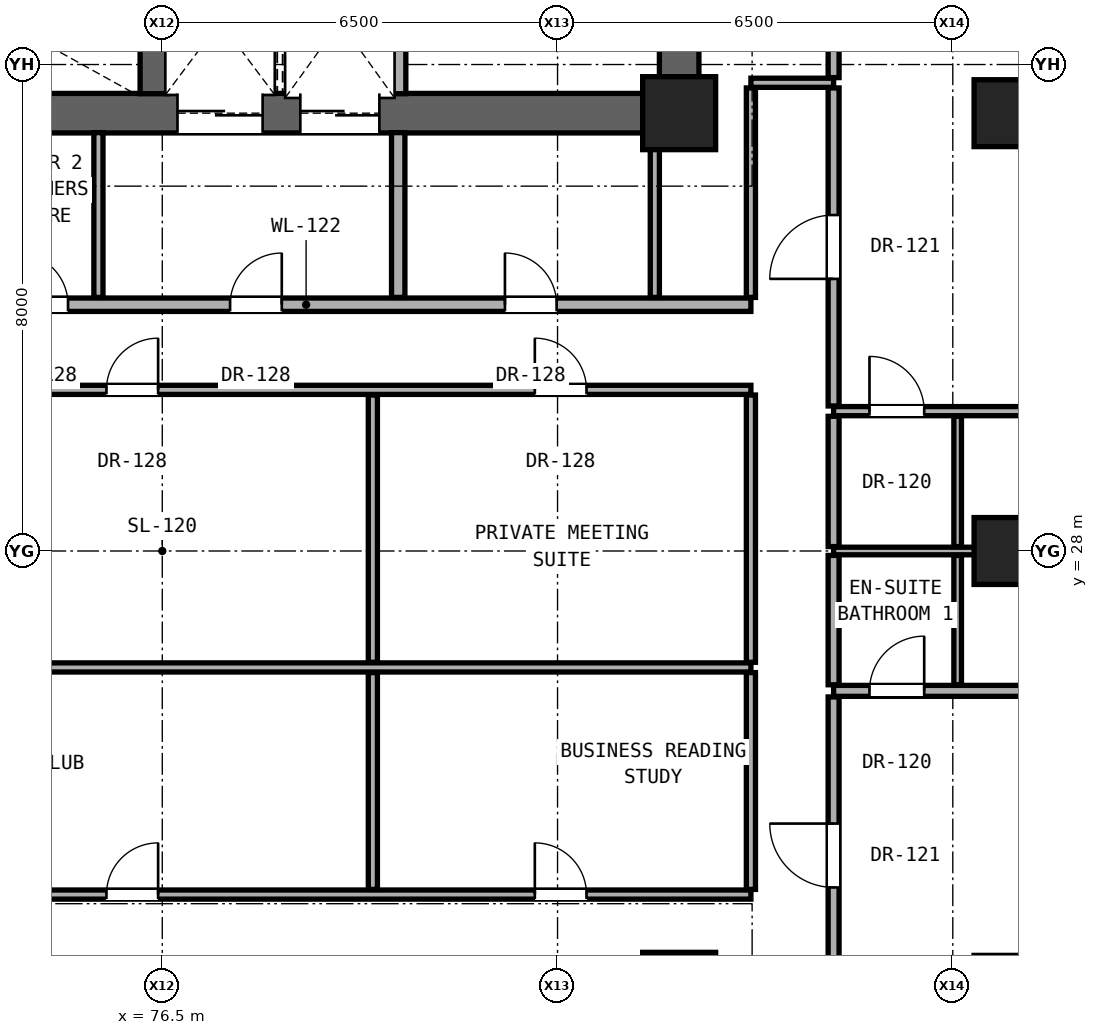
"""IFC4 building model, lengths in metres.
Left out: names, types, materials, properties, quantities, classifications, styles, units other than length and angle.
Written with IfcOpenShell. Run it as: python <this file> out.ifc"""

import sys

from ifc_helpers import new_model, si_unit, direction, frame, frame_2d, origin, origin_2d, place, context, subcontext, project, spatial, rectangle, hollow_rectangle, extrude, element, fill, save


model = new_model("IFC4")
c1 = context("Model", 3, precision=1e-05, world=origin(), true_north=direction((0.0, 1.0)))
c2 = subcontext(c1, "Body", "Model", "MODEL_VIEW")
j1 = project(units=[si_unit("LENGTHUNIT", "METRE"), si_unit("PLANEANGLEUNIT", "RADIAN")], contexts=[c1])
p1 = place(None, origin())
s1 = spatial("IfcSite", under=j1, at=p1, CompositionType="ELEMENT")
p2 = place(p1, origin())
s2 = spatial("IfcBuilding", under=s1, at=p2, CompositionType="ELEMENT")
p3 = place(p2, frame((0.0, 0.0, 104.9)))
s3 = spatial("IfcBuildingStorey", under=s2, at=p3, CompositionType="ELEMENT", Elevation=104.9)
for number, where, z_axis, x_axis in (
    (1, (85.0, 20.8, 0.0), (0.0, 0.0, 1.0), (1.0, 0.0, 0.0)),
    (2, (85.0, 35.2, 0.0), (0.0, 0.0, 1.0), (1.0, 0.0, 0.0)),
):
    element("IfcColumn", number, at=place(p3, frame(where, z_axis=z_axis, x_axis=x_axis)), inside=s3, PredefinedType="COLUMN", context=c2, shape_type="SweptSolid", body=[
        extrude(rectangle(XDim=1.2, YDim=1.2, at=origin_2d()), origin(), (0.0, 0.0, 1.0), 3.3),
    ])
for number, where, z_axis, x_axis in (
    (3, (90.4, 28.0, 0.0), (0.0, 0.0, 1.0), (1.0, 0.0, 0.0)),
    (4, (90.4, 35.2, 0.0), (0.0, 0.0, 1.0), (1.0, 0.0, 0.0)),
):
    element("IfcColumn", number, at=place(p3, frame(where, z_axis=z_axis, x_axis=x_axis)), inside=s3, PredefinedType="COLUMN", context=c2, shape_type="SweptSolid", body=[
        extrude(hollow_rectangle(XDim=1.1, YDim=1.1, WallThickness=0.06, at=origin_2d()), origin(), (0.0, 0.0, 1.0), 3.3),
    ])
p4 = place(p3, frame((85.0, 35.2, 0.0), z_axis=(0.0, 0.0, 1.0), x_axis=(0.0, 1.0, 0.0)))
e5 = element("IfcWall", 5, at=p4, inside=s3, PredefinedType="SHEAR", context=c2, shape_type="SweptSolid", body=[
    extrude(rectangle(XDim=5.6, YDim=0.65, at=frame_2d((2.8, 0.0))), origin(), (0.0, 0.0, 1.0), 3.08),
])
p5 = place(p3, frame((68.0, 35.2, 0.0), z_axis=(0.0, 0.0, 1.0), x_axis=(1.0, 0.0, 0.0)))
e6 = element("IfcWall", 6, at=p5, inside=s3, PredefinedType="SHEAR", context=c2, shape_type="SweptSolid", body=[
    extrude(rectangle(XDim=17.0, YDim=0.65, at=frame_2d((8.5, 0.0))), origin(), (0.0, 0.0, 1.0), 3.08),
])
p6 = place(p5, frame((1.06, 0.0, 0.0)))
e7 = element("IfcOpeningElement", 7, at=p6, cuts=e6, PredefinedType="OPENING", context=c2, shape_type="SweptSolid", body=[
    extrude(rectangle(XDim=1.15, YDim=2.2, at=frame_2d((0.575, 1.1))), frame((0.0, 0.335, 0.0), z_axis=(0.0, -1.0, 0.0), x_axis=(1.0, 0.0, 0.0)), (0.0, 0.0, 1.0), 0.67),
])
p7 = place(p5, frame((8.75, 0.0, 0.0)))
e8 = element("IfcOpeningElement", 8, at=p7, cuts=e6, PredefinedType="OPENING", context=c2, shape_type="SweptSolid", body=[
    extrude(rectangle(XDim=1.4, YDim=2.35, at=frame_2d((0.7, 1.175))), frame((0.0, 0.335, 0.0), z_axis=(0.0, -1.0, 0.0), x_axis=(1.0, 0.0, 0.0)), (0.0, 0.0, 1.0), 0.67),
])
p8 = place(p5, frame((10.77, 0.0, 0.0)))
e9 = element("IfcOpeningElement", 9, at=p8, cuts=e6, PredefinedType="OPENING", context=c2, shape_type="SweptSolid", body=[
    extrude(rectangle(XDim=1.3, YDim=2.3, at=frame_2d((0.65, 1.15))), frame((0.0, 0.335, 0.0), z_axis=(0.0, -1.0, 0.0), x_axis=(1.0, 0.0, 0.0)), (0.0, 0.0, 1.0), 0.67),
])
p9 = place(p3, frame((66.68, 22.35, 0.0), z_axis=(0.0, 0.0, 1.0), x_axis=(1.0, 0.0, 0.0)))
e10 = element("IfcWall", 10, at=p9, inside=s3, PredefinedType="PARTITIONING", context=c2, shape_type="SweptSolid", body=[
    extrude(rectangle(XDim=19.5, YDim=0.15, at=frame_2d((9.75, 0.0))), origin(), (0.0, 0.0, 1.0), 2.145),
])
p10 = place(p9, frame((8.902, 0.0, 0.0)))
e11 = element("IfcOpeningElement", 11, at=p10, cuts=e10, PredefinedType="OPENING", context=c2, shape_type="SweptSolid", body=[
    extrude(rectangle(XDim=0.85, YDim=2.01, at=frame_2d((0.425, 1.005))), frame((0.0, 0.085, 0.0), z_axis=(0.0, -1.0, 0.0), x_axis=(1.0, 0.0, 0.0)), (0.0, 0.0, 1.0), 0.17),
])
p11 = place(p9, frame((15.947, 0.0, 0.0)))
e12 = element("IfcOpeningElement", 12, at=p11, cuts=e10, PredefinedType="OPENING", context=c2, shape_type="SweptSolid", body=[
    extrude(rectangle(XDim=0.85, YDim=2.01, at=frame_2d((0.425, 1.005))), frame((0.0, 0.085, 0.0), z_axis=(0.0, -1.0, 0.0), x_axis=(1.0, 0.0, 0.0)), (0.0, 0.0, 1.0), 0.17),
])
p12 = place(p3, frame((87.54, 25.7, 0.0), z_axis=(0.0, 0.0, 1.0), x_axis=(1.0, 0.0, 0.0)))
e13 = element("IfcWall", 13, at=p12, inside=s3, PredefinedType="PARTITIONING", context=c2, shape_type="SweptSolid", body=[
    extrude(rectangle(XDim=7.292, YDim=0.18, at=frame_2d((3.646, 0.0))), origin(), (0.0, 0.0, 1.0), 2.216),
])
p13 = place(p12, frame((4.171, 0.0, 0.0)))
e14 = element("IfcOpeningElement", 14, at=p13, cuts=e13, PredefinedType="OPENING", context=c2, shape_type="SweptSolid", body=[
    extrude(rectangle(XDim=0.95, YDim=2.15, at=frame_2d((0.475, 1.075))), frame((0.0, 0.1, 0.0), z_axis=(0.0, -1.0, 0.0), x_axis=(1.0, 0.0, 0.0)), (0.0, 0.0, 1.0), 0.2),
])
p14 = place(p12, frame((0.59, 0.0, 0.0)))
e15 = element("IfcOpeningElement", 15, at=p14, cuts=e13, PredefinedType="OPENING", context=c2, shape_type="SweptSolid", body=[
    extrude(rectangle(XDim=0.9, YDim=2.1, at=frame_2d((0.45, 1.05))), frame((0.0, 0.1, 0.0), z_axis=(0.0, -1.0, 0.0), x_axis=(1.0, 0.0, 0.0)), (0.0, 0.0, 1.0), 0.2),
])
p15 = place(p3, frame((72.05, 26.085, 0.0), z_axis=(0.0, 0.0, 1.0), x_axis=(1.0, 0.0, 0.0)))
e16 = element("IfcWall", 16, at=p15, inside=s3, PredefinedType="PARTITIONING", context=c2, shape_type="SweptSolid", body=[
    extrude(rectangle(XDim=14.13, YDim=0.15, at=frame_2d((7.065, 0.0))), origin(), (0.0, 0.0, 1.0), 2.145),
])
p16 = place(p3, frame((87.54, 28.0, 0.0), z_axis=(0.0, 0.0, 1.0), x_axis=(1.0, 0.0, 0.0)))
e17 = element("IfcWall", 17, at=p16, inside=s3, PredefinedType="PARTITIONING", context=c2, shape_type="SweptSolid", body=[
    extrude(rectangle(XDim=7.292, YDim=0.125, at=frame_2d((3.646, 0.0))), origin(), (0.0, 0.0, 1.0), 2.216),
])
p17 = place(p3, frame((87.54, 30.3, 0.0), z_axis=(0.0, 0.0, 1.0), x_axis=(1.0, 0.0, 0.0)))
e18 = element("IfcWall", 18, at=p17, inside=s3, PredefinedType="PARTITIONING", context=c2, shape_type="SweptSolid", body=[
    extrude(rectangle(XDim=7.292, YDim=0.15, at=frame_2d((3.646, 0.0))), origin(), (0.0, 0.0, 1.0), 2.216),
])
p18 = place(p17, frame((4.171, 0.0, 0.0)))
e19 = element("IfcOpeningElement", 19, at=p18, cuts=e18, PredefinedType="OPENING", context=c2, shape_type="SweptSolid", body=[
    extrude(rectangle(XDim=0.95, YDim=2.15, at=frame_2d((0.475, 1.075))), frame((0.0, 0.085, 0.0), z_axis=(0.0, -1.0, 0.0), x_axis=(1.0, 0.0, 0.0)), (0.0, 0.0, 1.0), 0.17),
])
p19 = place(p17, frame((0.59, 0.0, 0.0)))
e20 = element("IfcOpeningElement", 20, at=p19, cuts=e18, PredefinedType="OPENING", context=c2, shape_type="SweptSolid", body=[
    extrude(rectangle(XDim=0.9, YDim=2.1, at=frame_2d((0.45, 1.05))), frame((0.0, 0.085, 0.0), z_axis=(0.0, -1.0, 0.0), x_axis=(1.0, 0.0, 0.0)), (0.0, 0.0, 1.0), 0.17),
])
p20 = place(p3, frame((66.68, 30.65, 0.0), z_axis=(0.0, 0.0, 1.0), x_axis=(1.0, 0.0, 0.0)))
e21 = element("IfcWall", 21, at=p20, inside=s3, PredefinedType="PARTITIONING", context=c2, shape_type="SweptSolid", body=[
    extrude(rectangle(XDim=19.5, YDim=0.15, at=frame_2d((9.75, 0.0))), origin(), (0.0, 0.0, 1.0), 2.145),
])
p21 = place(p20, frame((3.795, 0.0, 0.0)))
e22 = element("IfcOpeningElement", 22, at=p21, cuts=e21, PredefinedType="OPENING", context=c2, shape_type="SweptSolid", body=[
    extrude(rectangle(XDim=0.85, YDim=2.01, at=frame_2d((0.425, 1.005))), frame((0.0, 0.085, 0.0), z_axis=(0.0, -1.0, 0.0), x_axis=(1.0, 0.0, 0.0)), (0.0, 0.0, 1.0), 0.17),
])
p22 = place(p20, frame((8.902, 0.0, 0.0)))
e23 = element("IfcOpeningElement", 23, at=p22, cuts=e21, PredefinedType="OPENING", context=c2, shape_type="SweptSolid", body=[
    extrude(rectangle(XDim=0.85, YDim=2.01, at=frame_2d((0.425, 1.005))), frame((0.0, 0.085, 0.0), z_axis=(0.0, -1.0, 0.0), x_axis=(1.0, 0.0, 0.0)), (0.0, 0.0, 1.0), 0.17),
])
p23 = place(p20, frame((15.947, 0.0, 0.0)))
e24 = element("IfcOpeningElement", 24, at=p23, cuts=e21, PredefinedType="OPENING", context=c2, shape_type="SweptSolid", body=[
    extrude(rectangle(XDim=0.85, YDim=2.01, at=frame_2d((0.425, 1.005))), frame((0.0, 0.085, 0.0), z_axis=(0.0, -1.0, 0.0), x_axis=(1.0, 0.0, 0.0)), (0.0, 0.0, 1.0), 0.17),
])
p24 = place(p3, frame((71.55, 32.05, 0.0), z_axis=(0.0, 0.0, 1.0), x_axis=(1.0, 0.0, 0.0)))
e25 = element("IfcWall", 25, at=p24, inside=s3, PredefinedType="SOLIDWALL", context=c2, shape_type="SweptSolid", body=[
    extrude(rectangle(XDim=14.63, YDim=0.22, at=frame_2d((7.315, 0.0))), origin(), (0.0, 0.0, 1.0), 2.145),
])
p25 = place(p24, frame((6.065, 0.0, 0.0)))
e26 = element("IfcOpeningElement", 26, at=p25, cuts=e25, PredefinedType="OPENING", context=c2, shape_type="SweptSolid", body=[
    extrude(rectangle(XDim=0.85, YDim=2.01, at=frame_2d((0.425, 1.005))), frame((0.0, 0.12, 0.0), z_axis=(0.0, -1.0, 0.0), x_axis=(1.0, 0.0, 0.0)), (0.0, 0.0, 1.0), 0.24),
])
p26 = place(p24, frame((10.585, 0.0, 0.0)))
e27 = element("IfcOpeningElement", 27, at=p26, cuts=e25, PredefinedType="OPENING", context=c2, shape_type="SweptSolid", body=[
    extrude(rectangle(XDim=0.85, YDim=2.01, at=frame_2d((0.425, 1.005))), frame((0.0, 0.12, 0.0), z_axis=(0.0, -1.0, 0.0), x_axis=(1.0, 0.0, 0.0)), (0.0, 0.0, 1.0), 0.24),
])
p27 = place(p24, frame((0.7, 0.0, 0.0)))
e28 = element("IfcOpeningElement", 28, at=p27, cuts=e25, PredefinedType="OPENING", context=c2, shape_type="SweptSolid", body=[
    extrude(rectangle(XDim=0.85, YDim=2.01, at=frame_2d((0.425, 1.005))), frame((0.0, 0.12, 0.0), z_axis=(0.0, -1.0, 0.0), x_axis=(1.0, 0.0, 0.0)), (0.0, 0.0, 1.0), 0.24),
])
p28 = place(p24, frame((2.55, 0.0, 0.0)))
e29 = element("IfcOpeningElement", 29, at=p28, cuts=e25, PredefinedType="OPENING", context=c2, shape_type="SweptSolid", body=[
    extrude(rectangle(XDim=0.85, YDim=2.01, at=frame_2d((0.425, 1.005))), frame((0.0, 0.12, 0.0), z_axis=(0.0, -1.0, 0.0), x_axis=(1.0, 0.0, 0.0)), (0.0, 0.0, 1.0), 0.24),
])
p29 = place(p3, frame((86.18, 35.7, 0.0), z_axis=(0.0, 0.0, 1.0), x_axis=(1.0, 0.0, 0.0)))
e30 = element("IfcWall", 30, at=p29, inside=s3, PredefinedType="PARTITIONING", context=c2, shape_type="SweptSolid", body=[
    extrude(rectangle(XDim=1.36, YDim=0.15, at=frame_2d((0.68, 0.0))), origin(), (0.0, 0.0, 1.0), 3.08),
])
p30 = place(p3, frame((75.45, 32.17, 0.0), z_axis=(0.0, 0.0, 1.0), x_axis=(0.0, 1.0, 0.0)))
e31 = element("IfcWall", 31, at=p30, inside=s3, PredefinedType="PARTITIONING", context=c2, shape_type="SweptSolid", body=[
    extrude(rectangle(XDim=2.71, YDim=0.15, at=frame_2d((1.355, 0.0))), origin(), (0.0, 0.0, 1.0), 3.08),
])
p31 = place(p3, frame((76.36, 35.52, 0.0), z_axis=(0.0, 0.0, 1.0), x_axis=(0.0, 1.0, 0.0)))
e32 = element("IfcWall", 32, at=p31, inside=s3, PredefinedType="SHEAR", context=c2, shape_type="SweptSolid", body=[
    extrude(rectangle(XDim=2.745, YDim=0.45, at=frame_2d((1.373, 0.0))), origin(), (0.0, 0.0, 1.0), 3.08),
])
p32 = place(p3, frame((79.963, 22.435, 0.0), z_axis=(0.0, 0.0, 1.0), x_axis=(0.0, 1.0, 0.0)))
e33 = element("IfcWall", 33, at=p32, inside=s3, PredefinedType="PARTITIONING", context=c2, shape_type="SweptSolid", body=[
    extrude(rectangle(XDim=3.565, YDim=0.15, at=frame_2d((1.782, 0.0))), origin(), (0.0, 0.0, 1.0), 3.08),
])
p33 = place(p3, frame((79.963, 26.17, 0.0), z_axis=(0.0, 0.0, 1.0), x_axis=(0.0, 1.0, 0.0)))
e34 = element("IfcWall", 34, at=p33, inside=s3, PredefinedType="PARTITIONING", context=c2, shape_type="SweptSolid", body=[
    extrude(rectangle(XDim=4.395, YDim=0.15, at=frame_2d((2.198, 0.0))), origin(), (0.0, 0.0, 1.0), 2.145),
])
p34 = place(p3, frame((80.38, 32.17, 0.0), z_axis=(0.0, 0.0, 1.0), x_axis=(0.0, 1.0, 0.0)))
e35 = element("IfcWall", 35, at=p34, inside=s3, PredefinedType="SOLIDWALL", context=c2, shape_type="SweptSolid", body=[
    extrude(rectangle(XDim=2.71, YDim=0.22, at=frame_2d((1.355, 0.0))), origin(), (0.0, 0.0, 1.0), 3.08),
])
p35 = place(p3, frame((80.38, 35.52, 0.0), z_axis=(0.0, 0.0, 1.0), x_axis=(0.0, 1.0, 0.0)))
e36 = element("IfcWall", 36, at=p35, inside=s3, PredefinedType="SOLIDWALL", context=c2, shape_type="SweptSolid", body=[
    extrude(rectangle(XDim=2.345, YDim=0.25, at=frame_2d((1.172, 0.0))), origin(), (0.0, 0.0, 1.0), 3.08),
])
p36 = place(p3, frame((84.6, 32.17, 0.0), z_axis=(0.0, 0.0, 1.0), x_axis=(0.0, 1.0, 0.0)))
e37 = element("IfcWall", 37, at=p36, inside=s3, PredefinedType="PARTITIONING", context=c2, shape_type="SweptSolid", body=[
    extrude(rectangle(XDim=2.71, YDim=0.15, at=frame_2d((1.355, 0.0))), origin(), (0.0, 0.0, 1.0), 3.08),
])
p37 = place(p3, frame((86.18, 22.435, 0.0), z_axis=(0.0, 0.0, 1.0), x_axis=(0.0, 1.0, 0.0)))
e38 = element("IfcWall", 38, at=p37, inside=s3, PredefinedType="PARTITIONING", context=c2, shape_type="SweptSolid", body=[
    extrude(rectangle(XDim=3.565, YDim=0.15, at=frame_2d((1.782, 0.0))), origin(), (0.0, 0.0, 1.0), 3.08),
])
p38 = place(p3, frame((86.18, 26.17, 0.0), z_axis=(0.0, 0.0, 1.0), x_axis=(0.0, 1.0, 0.0)))
e39 = element("IfcWall", 39, at=p38, inside=s3, PredefinedType="PARTITIONING", context=c2, shape_type="SweptSolid", body=[
    extrude(rectangle(XDim=4.395, YDim=0.15, at=frame_2d((2.198, 0.0))), origin(), (0.0, 0.0, 1.0), 2.299),
])
p39 = place(p3, frame((86.18, 32.17, 0.0), z_axis=(0.0, 0.0, 1.0), x_axis=(0.0, 1.0, 0.0)))
e40 = element("IfcWall", 40, at=p39, inside=s3, PredefinedType="PARTITIONING", context=c2, shape_type="SweptSolid", body=[
    extrude(rectangle(XDim=3.445, YDim=0.15, at=frame_2d((1.723, 0.0))), origin(), (0.0, 0.0, 1.0), 2.472),
])
p40 = place(p3, frame((87.54, 20.385, 0.0), z_axis=(0.0, 0.0, 1.0), x_axis=(0.0, 1.0, 0.0)))
e41 = element("IfcWall", 41, at=p40, inside=s3, PredefinedType="PARTITIONING", context=c2, shape_type="SweptSolid", body=[
    extrude(rectangle(XDim=5.215, YDim=0.18, at=frame_2d((2.607, 0.0))), origin(), (0.0, 0.0, 1.0), 2.472),
])
p41 = place(p40, frame((2.083, 0.0, 0.0)))
e42 = element("IfcOpeningElement", 42, at=p41, cuts=e41, PredefinedType="OPENING", context=c2, shape_type="SweptSolid", body=[
    extrude(rectangle(XDim=1.05, YDim=2.2, at=frame_2d((0.525, 1.1))), frame((0.0, 0.1, 0.0), z_axis=(0.0, -1.0, 0.0), x_axis=(1.0, 0.0, 0.0)), (0.0, 0.0, 1.0), 0.2),
])
p42 = place(p3, frame((87.54, 25.8, 0.0), z_axis=(0.0, 0.0, 1.0), x_axis=(0.0, 1.0, 0.0)))
e43 = element("IfcWall", 43, at=p42, inside=s3, PredefinedType="PARTITIONING", context=c2, shape_type="SweptSolid", body=[
    extrude(rectangle(XDim=2.127, YDim=0.18, at=frame_2d((1.064, 0.0))), origin(), (0.0, 0.0, 1.0), 2.299),
])
p43 = place(p3, frame((87.54, 28.073, 0.0), z_axis=(0.0, 0.0, 1.0), x_axis=(0.0, 1.0, 0.0)))
e44 = element("IfcWall", 44, at=p43, inside=s3, PredefinedType="PARTITIONING", context=c2, shape_type="SweptSolid", body=[
    extrude(rectangle(XDim=2.143, YDim=0.18, at=frame_2d((1.071, 0.0))), origin(), (0.0, 0.0, 1.0), 2.299),
])
p44 = place(p3, frame((87.54, 30.385, 0.0), z_axis=(0.0, 0.0, 1.0), x_axis=(0.0, 1.0, 0.0)))
e45 = element("IfcWall", 45, at=p44, inside=s3, PredefinedType="PARTITIONING", context=c2, shape_type="SweptSolid", body=[
    extrude(rectangle(XDim=5.23, YDim=0.18, at=frame_2d((2.615, 0.0))), origin(), (0.0, 0.0, 1.0), 2.472),
])
p45 = place(p44, frame((2.09, 0.0, 0.0)))
e46 = element("IfcOpeningElement", 46, at=p45, cuts=e45, PredefinedType="OPENING", context=c2, shape_type="SweptSolid", body=[
    extrude(rectangle(XDim=1.05, YDim=2.2, at=frame_2d((0.525, 1.1))), frame((0.0, 0.1, 0.0), z_axis=(0.0, -1.0, 0.0), x_axis=(1.0, 0.0, 0.0)), (0.0, 0.0, 1.0), 0.2),
])
p46 = place(p3, frame((87.54, 35.785, 0.0), z_axis=(0.0, 0.0, 1.0), x_axis=(0.0, 1.0, 0.0)))
e47 = element("IfcWall", 47, at=p46, inside=s3, PredefinedType="PARTITIONING", context=c2, shape_type="SweptSolid", body=[
    extrude(rectangle(XDim=3.628, YDim=0.18, at=frame_2d((1.814, 0.0))), origin(), (0.0, 0.0, 1.0), 2.456),
])
p47 = place(p3, frame((89.58, 25.8, 0.0), z_axis=(0.0, 0.0, 1.0), x_axis=(0.0, 1.0, 0.0)))
e48 = element("IfcWall", 48, at=p47, inside=s3, PredefinedType="PARTITIONING", context=c2, shape_type="SweptSolid", body=[
    extrude(rectangle(XDim=2.127, YDim=0.125, at=frame_2d((1.064, 0.0))), origin(), (0.0, 0.0, 1.0), 2.299),
])
p48 = place(p3, frame((89.58, 28.073, 0.0), z_axis=(0.0, 0.0, 1.0), x_axis=(0.0, 1.0, 0.0)))
e49 = element("IfcWall", 49, at=p48, inside=s3, PredefinedType="PARTITIONING", context=c2, shape_type="SweptSolid", body=[
    extrude(rectangle(XDim=2.143, YDim=0.125, at=frame_2d((1.071, 0.0))), origin(), (0.0, 0.0, 1.0), 2.299),
])
p49 = place(p25, origin())
e50 = element("IfcDoor", 50, at=p49, inside=s3, OperationType="SINGLE_SWING_RIGHT", PredefinedType="DOOR", context=c2, shape_type="SweptSolid", body=[
    extrude(rectangle(XDim=0.85, YDim=2.01, at=frame_2d((0.425, 1.005))), frame((0.0, 0.025, 0.0), z_axis=(0.0, -1.0, 0.0), x_axis=(1.0, 0.0, 0.0)), (0.0, 0.0, 1.0), 0.05),
])
fill(e26, e50)
p50 = place(p26, origin())
e51 = element("IfcDoor", 51, at=p50, inside=s3, OperationType="SINGLE_SWING_LEFT", PredefinedType="DOOR", context=c2, shape_type="SweptSolid", body=[
    extrude(rectangle(XDim=0.85, YDim=2.01, at=frame_2d((0.425, 1.005))), frame((0.0, 0.025, 0.0), z_axis=(0.0, -1.0, 0.0), x_axis=(1.0, 0.0, 0.0)), (0.0, 0.0, 1.0), 0.05),
])
fill(e27, e51)
p51 = place(p28, origin())
e52 = element("IfcDoor", 52, at=p51, inside=s3, OperationType="SINGLE_SWING_LEFT", PredefinedType="DOOR", context=c2, shape_type="SweptSolid", body=[
    extrude(rectangle(XDim=0.85, YDim=2.01, at=frame_2d((0.425, 1.005))), frame((0.0, 0.025, 0.0), z_axis=(0.0, -1.0, 0.0), x_axis=(1.0, 0.0, 0.0)), (0.0, 0.0, 1.0), 0.05),
])
fill(e29, e52)
p52 = place(p41, origin())
e53 = element("IfcDoor", 53, at=p52, inside=s3, OperationType="SINGLE_SWING_RIGHT", PredefinedType="DOOR", context=c2, shape_type="SweptSolid", body=[
    extrude(rectangle(XDim=1.05, YDim=2.2, at=frame_2d((0.525, 1.1))), frame((0.0, 0.025, 0.0), z_axis=(0.0, -1.0, 0.0), x_axis=(1.0, 0.0, 0.0)), (0.0, 0.0, 1.0), 0.05),
])
fill(e42, e53)
p53 = place(p14, origin())
e54 = element("IfcDoor", 54, at=p53, inside=s3, OperationType="SINGLE_SWING_RIGHT", PredefinedType="DOOR", context=c2, shape_type="SweptSolid", body=[
    extrude(rectangle(XDim=0.9, YDim=2.1, at=frame_2d((0.45, 1.05))), frame((0.0, 0.025, 0.0), z_axis=(0.0, -1.0, 0.0), x_axis=(1.0, 0.0, 0.0)), (0.0, 0.0, 1.0), 0.05),
])
fill(e15, e54)
p54 = place(p45, origin())
e55 = element("IfcDoor", 55, at=p54, inside=s3, OperationType="SINGLE_SWING_LEFT", PredefinedType="DOOR", context=c2, shape_type="SweptSolid", body=[
    extrude(rectangle(XDim=1.05, YDim=2.2, at=frame_2d((0.525, 1.1))), frame((0.0, 0.025, 0.0), z_axis=(0.0, -1.0, 0.0), x_axis=(1.0, 0.0, 0.0)), (0.0, 0.0, 1.0), 0.05),
])
fill(e46, e55)
p55 = place(p19, origin())
e56 = element("IfcDoor", 56, at=p55, inside=s3, OperationType="SINGLE_SWING_LEFT", PredefinedType="DOOR", context=c2, shape_type="SweptSolid", body=[
    extrude(rectangle(XDim=0.9, YDim=2.1, at=frame_2d((0.45, 1.05))), frame((0.0, 0.025, 0.0), z_axis=(0.0, -1.0, 0.0), x_axis=(1.0, 0.0, 0.0)), (0.0, 0.0, 1.0), 0.05),
])
fill(e20, e56)
p56 = place(p10, origin())
e57 = element("IfcDoor", 57, at=p56, inside=s3, OperationType="SINGLE_SWING_RIGHT", PredefinedType="DOOR", context=c2, shape_type="SweptSolid", body=[
    extrude(rectangle(XDim=0.85, YDim=2.01, at=frame_2d((0.425, 1.005))), frame((0.0, 0.025, 0.0), z_axis=(0.0, -1.0, 0.0), x_axis=(1.0, 0.0, 0.0)), (0.0, 0.0, 1.0), 0.05),
])
fill(e11, e57)
p57 = place(p11, origin())
e58 = element("IfcDoor", 58, at=p57, inside=s3, OperationType="SINGLE_SWING_LEFT", PredefinedType="DOOR", context=c2, shape_type="SweptSolid", body=[
    extrude(rectangle(XDim=0.85, YDim=2.01, at=frame_2d((0.425, 1.005))), frame((0.0, 0.025, 0.0), z_axis=(0.0, -1.0, 0.0), x_axis=(1.0, 0.0, 0.0)), (0.0, 0.0, 1.0), 0.05),
])
fill(e12, e58)
p58 = place(p22, origin())
e59 = element("IfcDoor", 59, at=p58, inside=s3, OperationType="SINGLE_SWING_RIGHT", PredefinedType="DOOR", context=c2, shape_type="SweptSolid", body=[
    extrude(rectangle(XDim=0.85, YDim=2.01, at=frame_2d((0.425, 1.005))), frame((0.0, 0.025, 0.0), z_axis=(0.0, -1.0, 0.0), x_axis=(1.0, 0.0, 0.0)), (0.0, 0.0, 1.0), 0.05),
])
fill(e23, e59)
p59 = place(p23, origin())
e60 = element("IfcDoor", 60, at=p59, inside=s3, OperationType="SINGLE_SWING_LEFT", PredefinedType="DOOR", context=c2, shape_type="SweptSolid", body=[
    extrude(rectangle(XDim=0.85, YDim=2.01, at=frame_2d((0.425, 1.005))), frame((0.0, 0.025, 0.0), z_axis=(0.0, -1.0, 0.0), x_axis=(1.0, 0.0, 0.0)), (0.0, 0.0, 1.0), 0.05),
])
fill(e24, e60)
p60 = place(p7, origin())
e61 = element("IfcDoor", 61, at=p60, inside=s3, OperationType="DOUBLE_DOOR_SLIDING", PredefinedType="DOOR", context=c2, shape_type="SweptSolid", body=[
    extrude(rectangle(XDim=1.4, YDim=2.35, at=frame_2d((0.7, 1.175))), frame((0.0, 0.025, 0.0), z_axis=(0.0, -1.0, 0.0), x_axis=(1.0, 0.0, 0.0)), (0.0, 0.0, 1.0), 0.05),
])
fill(e8, e61)
p61 = place(p8, origin())
e62 = element("IfcDoor", 62, at=p61, inside=s3, OperationType="DOUBLE_DOOR_SLIDING", PredefinedType="DOOR", context=c2, shape_type="SweptSolid", body=[
    extrude(rectangle(XDim=1.3, YDim=2.3, at=frame_2d((0.65, 1.15))), frame((0.0, 0.025, 0.0), z_axis=(0.0, -1.0, 0.0), x_axis=(1.0, 0.0, 0.0)), (0.0, 0.0, 1.0), 0.05),
])
fill(e9, e62)
save(model, sys.argv[1])
